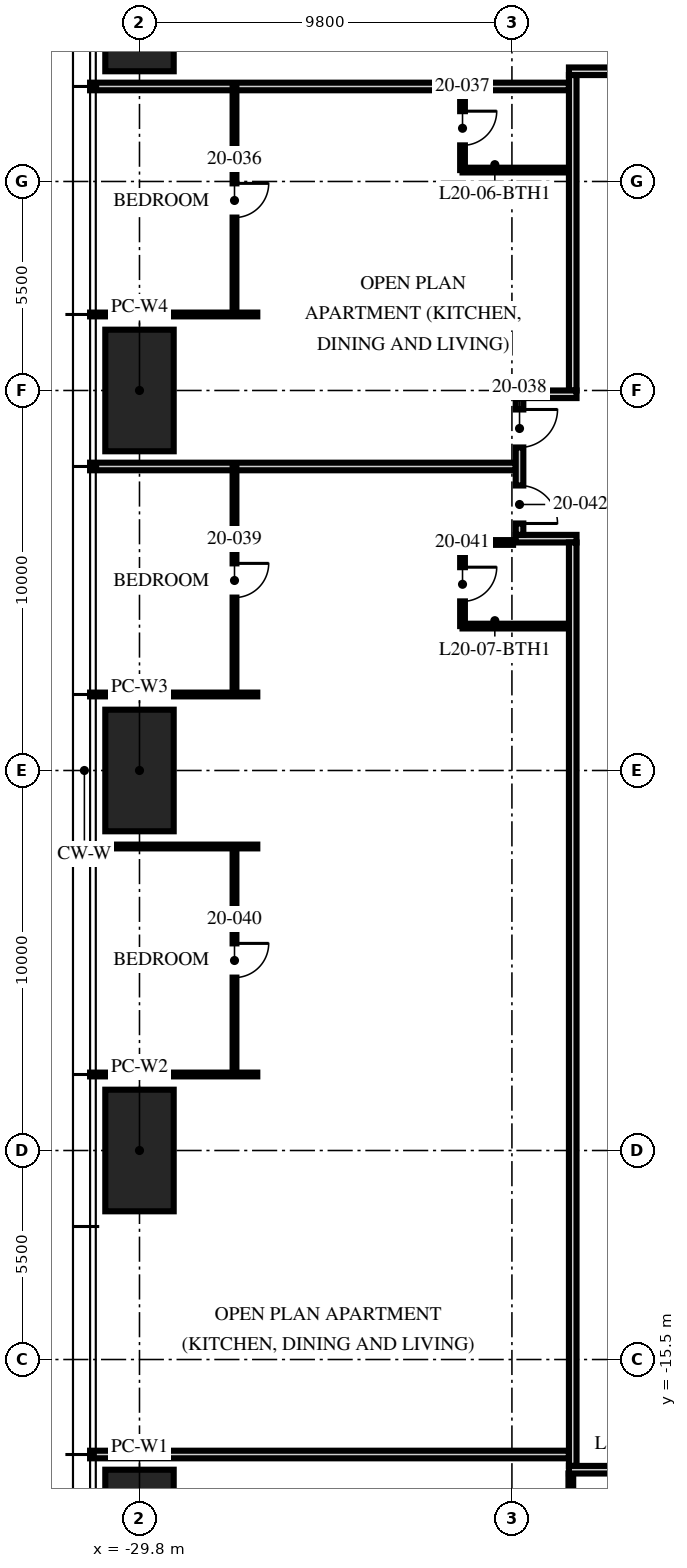
"""IFC4 building model, lengths in metres.
Left out: names, types, materials, properties, quantities, classifications, styles, units other than length and angle.
Written with IfcOpenShell. Run it as: python <this file> out.ifc"""

import sys

from ifc_helpers import new_model, si_unit, direction, frame, frame_2d, origin, origin_2d, place, context, subcontext, project, spatial, rectangle, hollow_rectangle, extrude, element, fill, save


model = new_model("IFC4")
c1 = context("Model", 3, precision=1e-05, world=origin(), true_north=direction((0.0, 1.0)))
c2 = subcontext(c1, "Body", "Model", "MODEL_VIEW")
j1 = project(units=[si_unit("LENGTHUNIT", "METRE"), si_unit("PLANEANGLEUNIT", "RADIAN")], contexts=[c1])
p1 = place(None, origin())
s1 = spatial("IfcSite", under=j1, at=p1, CompositionType="ELEMENT")
p2 = place(p1, origin())
s2 = spatial("IfcBuilding", under=s1, at=p2, CompositionType="ELEMENT")
p3 = place(p2, frame((0.0, 0.0, 81.0)))
s3 = spatial("IfcBuildingStorey", under=s2, at=p3, CompositionType="ELEMENT", Elevation=81.0)
for number, where, z_axis, x_axis in (
    (1, (-29.8, -20.0, 0.0), (0.0, 0.0, 1.0), (0.0, 1.0, 0.0)),
    (2, (-29.8, -10.0, 0.0), (0.0, 0.0, 1.0), (0.0, 1.0, 0.0)),
    (3, (-29.8, 0.0, 0.0), (0.0, 0.0, 1.0), (0.0, 1.0, 0.0)),
    (4, (-29.8, 10.0, 0.0), (0.0, 0.0, 1.0), (0.0, 1.0, 0.0)),
    (5, (-29.8, 20.0, 0.0), (0.0, 0.0, 1.0), (0.0, 1.0, 0.0)),
):
    element("IfcColumn", number, at=place(p3, frame(where, z_axis=z_axis, x_axis=x_axis)), inside=s3, PredefinedType="COLUMN", context=c2, shape_type="SweptSolid", body=[
        extrude(hollow_rectangle(XDim=3.2, YDim=1.8, WallThickness=0.2, at=origin_2d()), origin(), (0.0, 0.0, 1.0), 3.75),
    ])
p4 = place(p3, frame((-18.5, 18.0, 0.0), z_axis=(0.0, 0.0, 1.0), x_axis=(-1.0, 0.0, 0.0)))
e6 = element("IfcWall", 6, at=p4, inside=s3, PredefinedType="PARTITIONING", context=c2, shape_type="SweptSolid", body=[
    extrude(rectangle(XDim=12.6, YDim=0.2, at=frame_2d((6.3, 0.0))), origin(), (0.0, 0.0, 1.0), 2.3),
])
p5 = place(p3, frame((-26.7, 12.0, 0.0), z_axis=(0.0, 0.0, 1.0), x_axis=(-1.0, 0.0, 0.0)))
e7 = element("IfcWall", 7, at=p5, inside=s3, PredefinedType="PARTITIONING", context=c2, shape_type="SweptSolid", body=[
    extrude(rectangle(XDim=4.4, YDim=0.1, at=frame_2d((2.2, 0.0))), origin(), (0.0, 0.0, 1.0), 2.71),
])
p6 = place(p3, frame((-19.9, 8.0, 0.0), z_axis=(0.0, 0.0, 1.0), x_axis=(-1.0, 0.0, 0.0)))
e8 = element("IfcWall", 8, at=p6, inside=s3, PredefinedType="PARTITIONING", context=c2, shape_type="SweptSolid", body=[
    extrude(rectangle(XDim=11.2, YDim=0.2, at=frame_2d((5.6, 0.0))), origin(), (0.0, 0.0, 1.0), 2.71),
])
for number, where, z_axis, x_axis in (
    (9, (-26.7, 2.0, 0.0), (0.0, 0.0, 1.0), (-1.0, 0.0, 0.0)),
    (10, (-26.7, -2.0, 0.0), (0.0, 0.0, 1.0), (-1.0, 0.0, 0.0)),
    (11, (-26.7, -8.0, 0.0), (0.0, 0.0, 1.0), (-1.0, 0.0, 0.0)),
):
    element("IfcWall", number, at=place(p3, frame(where, z_axis=z_axis, x_axis=x_axis)), inside=s3, PredefinedType="PARTITIONING", context=c2, shape_type="SweptSolid", body=[
        extrude(rectangle(XDim=4.4, YDim=0.1, at=frame_2d((2.2, 0.0))), origin(), (0.0, 0.0, 1.0), 2.71),
    ])
p7 = place(p3, frame((-18.5, -18.0, 0.0), z_axis=(0.0, 0.0, 1.0), x_axis=(-1.0, 0.0, 0.0)))
e12 = element("IfcWall", 12, at=p7, inside=s3, PredefinedType="PARTITIONING", context=c2, shape_type="SweptSolid", body=[
    extrude(rectangle(XDim=12.6, YDim=0.2, at=frame_2d((6.3, 0.0))), origin(), (0.0, 0.0, 1.0), 2.3),
])
p8 = place(p3, frame((-27.3, 18.0, 0.0), z_axis=(0.0, 0.0, 1.0), x_axis=(0.0, -1.0, 0.0)))
e13 = element("IfcWall", 13, at=p8, inside=s3, PredefinedType="PARTITIONING", context=c2, shape_type="SweptSolid", body=[
    extrude(rectangle(XDim=6.0, YDim=0.1, at=frame_2d((3.0, 0.0))), origin(), (0.0, 0.0, 1.0), 2.61),
])
p9 = place(p8, frame((2.55, 0.0, 0.0)))
e14 = element("IfcOpeningElement", 14, at=p9, cuts=e13, PredefinedType="OPENING", context=c2, shape_type="SweptSolid", body=[
    extrude(rectangle(XDim=0.9, YDim=2.1, at=frame_2d((0.45, 1.05))), frame((0.0, 0.06, 0.0), z_axis=(0.0, -1.0, 0.0), x_axis=(1.0, 0.0, 0.0)), (0.0, 0.0, 1.0), 0.12),
])
p10 = place(p3, frame((-21.3, 18.0, 0.0), z_axis=(0.0, 0.0, 1.0), x_axis=(0.0, -1.0, 0.0)))
e15 = element("IfcWall", 15, at=p10, inside=s3, PredefinedType="PARTITIONING", context=c2, shape_type="SweptSolid", body=[
    extrude(rectangle(XDim=2.2, YDim=0.125, at=frame_2d((1.1, 0.0))), origin(), (0.0, 0.0, 1.0), 3.5),
])
p11 = place(p10, frame((0.65, 0.0, 0.0)))
e16 = element("IfcOpeningElement", 16, at=p11, cuts=e15, PredefinedType="OPENING", context=c2, shape_type="SweptSolid", body=[
    extrude(rectangle(XDim=0.9, YDim=2.1, at=frame_2d((0.45, 1.05))), frame((0.0, 0.073, 0.0), z_axis=(0.0, -1.0, 0.0), x_axis=(1.0, 0.0, 0.0)), (0.0, 0.0, 1.0), 0.145),
])
p12 = place(p3, frame((-18.5, 15.8, 0.0), z_axis=(0.0, 0.0, 1.0), x_axis=(-1.0, 0.0, 0.0)))
e17 = element("IfcWall", 17, at=p12, inside=s3, PredefinedType="PARTITIONING", context=c2, shape_type="SweptSolid", body=[
    extrude(rectangle(XDim=2.8, YDim=0.125, at=frame_2d((1.4, 0.0))), origin(), (0.0, 0.0, 1.0), 3.5),
])
p13 = place(p3, frame((-27.3, 8.0, 0.0), z_axis=(0.0, 0.0, 1.0), x_axis=(0.0, -1.0, 0.0)))
e18 = element("IfcWall", 18, at=p13, inside=s3, PredefinedType="PARTITIONING", context=c2, shape_type="SweptSolid", body=[
    extrude(rectangle(XDim=6.0, YDim=0.1, at=frame_2d((3.0, 0.0))), origin(), (0.0, 0.0, 1.0), 2.61),
])
p14 = place(p13, frame((2.55, 0.0, 0.0)))
e19 = element("IfcOpeningElement", 19, at=p14, cuts=e18, PredefinedType="OPENING", context=c2, shape_type="SweptSolid", body=[
    extrude(rectangle(XDim=0.9, YDim=2.1, at=frame_2d((0.45, 1.05))), frame((0.0, 0.06, 0.0), z_axis=(0.0, -1.0, 0.0), x_axis=(1.0, 0.0, 0.0)), (0.0, 0.0, 1.0), 0.12),
])
p15 = place(p3, frame((-27.3, -2.0, 0.0), z_axis=(0.0, 0.0, 1.0), x_axis=(0.0, -1.0, 0.0)))
e20 = element("IfcWall", 20, at=p15, inside=s3, PredefinedType="PARTITIONING", context=c2, shape_type="SweptSolid", body=[
    extrude(rectangle(XDim=6.0, YDim=0.1, at=frame_2d((3.0, 0.0))), origin(), (0.0, 0.0, 1.0), 2.61),
])
p16 = place(p15, frame((2.55, 0.0, 0.0)))
e21 = element("IfcOpeningElement", 21, at=p16, cuts=e20, PredefinedType="OPENING", context=c2, shape_type="SweptSolid", body=[
    extrude(rectangle(XDim=0.9, YDim=2.1, at=frame_2d((0.45, 1.05))), frame((0.0, 0.06, 0.0), z_axis=(0.0, -1.0, 0.0), x_axis=(1.0, 0.0, 0.0)), (0.0, 0.0, 1.0), 0.12),
])
p17 = place(p3, frame((-21.3, 6.0, 0.0), z_axis=(0.0, 0.0, 1.0), x_axis=(0.0, -1.0, 0.0)))
e22 = element("IfcWall", 22, at=p17, inside=s3, PredefinedType="PARTITIONING", context=c2, shape_type="SweptSolid", body=[
    extrude(rectangle(XDim=2.2, YDim=0.125, at=frame_2d((1.1, 0.0))), origin(), (0.0, 0.0, 1.0), 2.61),
])
p18 = place(p17, frame((0.65, 0.0, 0.0)))
e23 = element("IfcOpeningElement", 23, at=p18, cuts=e22, PredefinedType="OPENING", context=c2, shape_type="SweptSolid", body=[
    extrude(rectangle(XDim=0.9, YDim=2.1, at=frame_2d((0.45, 1.05))), frame((0.0, 0.073, 0.0), z_axis=(0.0, -1.0, 0.0), x_axis=(1.0, 0.0, 0.0)), (0.0, 0.0, 1.0), 0.145),
])
p19 = place(p3, frame((-19.97, 6.0, 0.0), z_axis=(0.0, 0.0, 1.0), x_axis=(-1.0, 0.0, 0.0)))
e24 = element("IfcWall", 24, at=p19, inside=s3, PredefinedType="PARTITIONING", context=c2, shape_type="SweptSolid", body=[
    extrude(rectangle(XDim=1.33, YDim=0.125, at=frame_2d((0.665, 0.0))), origin(), (0.0, 0.0, 1.0), 3.5),
])
p20 = place(p3, frame((-18.5, 3.8, 0.0), z_axis=(0.0, 0.0, 1.0), x_axis=(-1.0, 0.0, 0.0)))
e25 = element("IfcWall", 25, at=p20, inside=s3, PredefinedType="PARTITIONING", context=c2, shape_type="SweptSolid", body=[
    extrude(rectangle(XDim=2.8, YDim=0.125, at=frame_2d((1.4, 0.0))), origin(), (0.0, 0.0, 1.0), 3.5),
])
p21 = place(p3, frame((-18.45, -18.5, 0.0), z_axis=(0.0, 0.0, 1.0), x_axis=(0.0, -1.0, 0.0)))
e26 = element("IfcWall", 26, at=p21, inside=s3, PredefinedType="PARTITIONING", context=c2, shape_type="SweptSolid", body=[
    extrude(rectangle(XDim=2.8, YDim=0.125, at=frame_2d((1.4, 0.0))), origin(), (0.0, 0.0, 1.0), 2.3),
])
p22 = place(p3, frame((-18.5, 18.4, 0.0), z_axis=(0.0, 0.0, 1.0), x_axis=(1.0, 0.0, 0.0)))
e27 = element("IfcWall", 27, at=p22, inside=s3, PredefinedType="PARTITIONING", context=c2, shape_type="SweptSolid", body=[
    extrude(rectangle(XDim=18.5, YDim=0.2, at=frame_2d((9.25, 0.0))), origin(), (0.0, 0.0, 1.0), 2.3),
])
p23 = place(p3, frame((-18.4, 18.3, 0.0), z_axis=(0.0, 0.0, 1.0), x_axis=(0.0, -1.0, 0.0)))
e28 = element("IfcWall", 28, at=p23, inside=s3, PredefinedType="PARTITIONING", context=c2, shape_type="SweptSolid", body=[
    extrude(rectangle(XDim=8.3, YDim=0.2, at=frame_2d((4.15, 0.0))), origin(), (0.0, 0.0, 1.0), 2.3),
])
p24 = place(p3, frame((-18.3, 9.9, 0.0), z_axis=(0.0, 0.0, 1.0), x_axis=(-1.0, 0.0, 0.0)))
e29 = element("IfcWall", 29, at=p24, inside=s3, PredefinedType="PARTITIONING", context=c2, shape_type="SweptSolid", body=[
    extrude(rectangle(XDim=1.6, YDim=0.2, at=frame_2d((0.8, 0.0))), origin(), (0.0, 0.0, 1.0), 2.492),
])
p25 = place(p3, frame((-18.3, 6.1, 0.0), z_axis=(0.0, 0.0, 1.0), x_axis=(-1.0, 0.0, 0.0)))
e30 = element("IfcWall", 30, at=p25, inside=s3, PredefinedType="PARTITIONING", context=c2, shape_type="SweptSolid", body=[
    extrude(rectangle(XDim=1.6, YDim=0.2, at=frame_2d((0.8, 0.0))), origin(), (0.0, 0.0, 1.0), 3.5),
])
p26 = place(p3, frame((-19.8, 9.8, 0.0), z_axis=(0.0, 0.0, 1.0), x_axis=(0.0, -1.0, 0.0)))
e31 = element("IfcWall", 31, at=p26, inside=s3, PredefinedType="PARTITIONING", context=c2, shape_type="SweptSolid", body=[
    extrude(rectangle(XDim=3.6, YDim=0.2, at=frame_2d((1.8, 0.0))), origin(), (0.0, 0.0, 1.0), 3.5),
])
p27 = place(p26, frame((0.3, 0.0, 0.0)))
e32 = element("IfcOpeningElement", 32, at=p27, cuts=e31, PredefinedType="OPENING", context=c2, shape_type="SweptSolid", body=[
    extrude(rectangle(XDim=1.0, YDim=2.2, at=frame_2d((0.5, 1.1))), frame((0.0, 0.11, 0.0), z_axis=(0.0, -1.0, 0.0), x_axis=(1.0, 0.0, 0.0)), (0.0, 0.0, 1.0), 0.22),
])
p28 = place(p26, frame((2.3, 0.0, 0.0)))
e33 = element("IfcOpeningElement", 33, at=p28, cuts=e31, PredefinedType="OPENING", context=c2, shape_type="SweptSolid", body=[
    extrude(rectangle(XDim=1.0, YDim=2.2, at=frame_2d((0.5, 1.1))), frame((0.0, 0.11, 0.0), z_axis=(0.0, -1.0, 0.0), x_axis=(1.0, 0.0, 0.0)), (0.0, 0.0, 1.0), 0.22),
])
p29 = place(p3, frame((-18.4, 6.0, 0.0), z_axis=(0.0, 0.0, 1.0), x_axis=(0.0, -1.0, 0.0)))
e34 = element("IfcWall", 34, at=p29, inside=s3, PredefinedType="PARTITIONING", context=c2, shape_type="SweptSolid", body=[
    extrude(rectangle(XDim=24.3, YDim=0.2, at=frame_2d((12.15, 0.0))), origin(), (0.0, 0.0, 1.0), 2.3),
])
p30 = place(p3, frame((18.5, -18.4, 0.0), z_axis=(0.0, 0.0, 1.0), x_axis=(-1.0, 0.0, 0.0)))
e35 = element("IfcWall", 35, at=p30, inside=s3, PredefinedType="PARTITIONING", context=c2, shape_type="SweptSolid", body=[
    extrude(rectangle(XDim=37.0, YDim=0.2, at=frame_2d((18.5, 0.0))), origin(), (0.0, 0.0, 1.0), 2.3),
])
p31 = place(p30, frame((27.1, 0.0, 0.0)))
e36 = element("IfcOpeningElement", 36, at=p31, cuts=e35, PredefinedType="OPENING", context=c2, shape_type="SweptSolid", body=[
    extrude(rectangle(XDim=1.0, YDim=2.2, at=frame_2d((0.5, 1.1))), frame((0.0, 0.11, 0.0), z_axis=(0.0, -1.0, 0.0), x_axis=(1.0, 0.0, 0.0)), (0.0, 0.0, 1.0), 0.22),
])
p32 = place(p30, frame((17.23, 0.0, 0.0)))
e37 = element("IfcOpeningElement", 37, at=p32, cuts=e35, PredefinedType="OPENING", context=c2, shape_type="SweptSolid", body=[
    extrude(rectangle(XDim=1.0, YDim=2.2, at=frame_2d((0.5, 1.1))), frame((0.0, 0.11, 0.0), z_axis=(0.0, -1.0, 0.0), x_axis=(1.0, 0.0, 0.0)), (0.0, 0.0, 1.0), 0.22),
])
p33 = place(p9, origin())
e38 = element("IfcDoor", 38, at=p33, inside=s3, OperationType="SINGLE_SWING_LEFT", PredefinedType="DOOR", context=c2, shape_type="SweptSolid", body=[
    extrude(rectangle(XDim=0.9, YDim=2.1, at=frame_2d((0.45, 1.05))), frame((0.0, 0.025, 0.0), z_axis=(0.0, -1.0, 0.0), x_axis=(1.0, 0.0, 0.0)), (0.0, 0.0, 1.0), 0.05),
])
fill(e14, e38)
p34 = place(p11, origin())
e39 = element("IfcDoor", 39, at=p34, inside=s3, OperationType="SINGLE_SWING_LEFT", PredefinedType="DOOR", context=c2, shape_type="SweptSolid", body=[
    extrude(rectangle(XDim=0.9, YDim=2.1, at=frame_2d((0.45, 1.05))), frame((0.0, 0.025, 0.0), z_axis=(0.0, -1.0, 0.0), x_axis=(1.0, 0.0, 0.0)), (0.0, 0.0, 1.0), 0.05),
])
fill(e16, e39)
p35 = place(p27, origin())
e40 = element("IfcDoor", 40, at=p35, inside=s3, OperationType="SINGLE_SWING_LEFT", PredefinedType="DOOR", context=c2, shape_type="SweptSolid", body=[
    extrude(rectangle(XDim=1.0, YDim=2.2, at=frame_2d((0.5, 1.1))), frame((0.0, 0.025, 0.0), z_axis=(0.0, -1.0, 0.0), x_axis=(1.0, 0.0, 0.0)), (0.0, 0.0, 1.0), 0.05),
])
fill(e32, e40)
p36 = place(p14, origin())
e41 = element("IfcDoor", 41, at=p36, inside=s3, OperationType="SINGLE_SWING_LEFT", PredefinedType="DOOR", context=c2, shape_type="SweptSolid", body=[
    extrude(rectangle(XDim=0.9, YDim=2.1, at=frame_2d((0.45, 1.05))), frame((0.0, 0.025, 0.0), z_axis=(0.0, -1.0, 0.0), x_axis=(1.0, 0.0, 0.0)), (0.0, 0.0, 1.0), 0.05),
])
fill(e19, e41)
p37 = place(p16, origin())
e42 = element("IfcDoor", 42, at=p37, inside=s3, OperationType="SINGLE_SWING_LEFT", PredefinedType="DOOR", context=c2, shape_type="SweptSolid", body=[
    extrude(rectangle(XDim=0.9, YDim=2.1, at=frame_2d((0.45, 1.05))), frame((0.0, 0.025, 0.0), z_axis=(0.0, -1.0, 0.0), x_axis=(1.0, 0.0, 0.0)), (0.0, 0.0, 1.0), 0.05),
])
fill(e21, e42)
p38 = place(p18, origin())
e43 = element("IfcDoor", 43, at=p38, inside=s3, OperationType="SINGLE_SWING_LEFT", PredefinedType="DOOR", context=c2, shape_type="SweptSolid", body=[
    extrude(rectangle(XDim=0.9, YDim=2.1, at=frame_2d((0.45, 1.05))), frame((0.0, 0.025, 0.0), z_axis=(0.0, -1.0, 0.0), x_axis=(1.0, 0.0, 0.0)), (0.0, 0.0, 1.0), 0.05),
])
fill(e23, e43)
p39 = place(p28, origin())
e44 = element("IfcDoor", 44, at=p39, inside=s3, OperationType="SINGLE_SWING_RIGHT", PredefinedType="DOOR", context=c2, shape_type="SweptSolid", body=[
    extrude(rectangle(XDim=1.0, YDim=2.2, at=frame_2d((0.5, 1.1))), frame((0.0, 0.025, 0.0), z_axis=(0.0, -1.0, 0.0), x_axis=(1.0, 0.0, 0.0)), (0.0, 0.0, 1.0), 0.05),
])
fill(e33, e44)
save(model, sys.argv[1])
